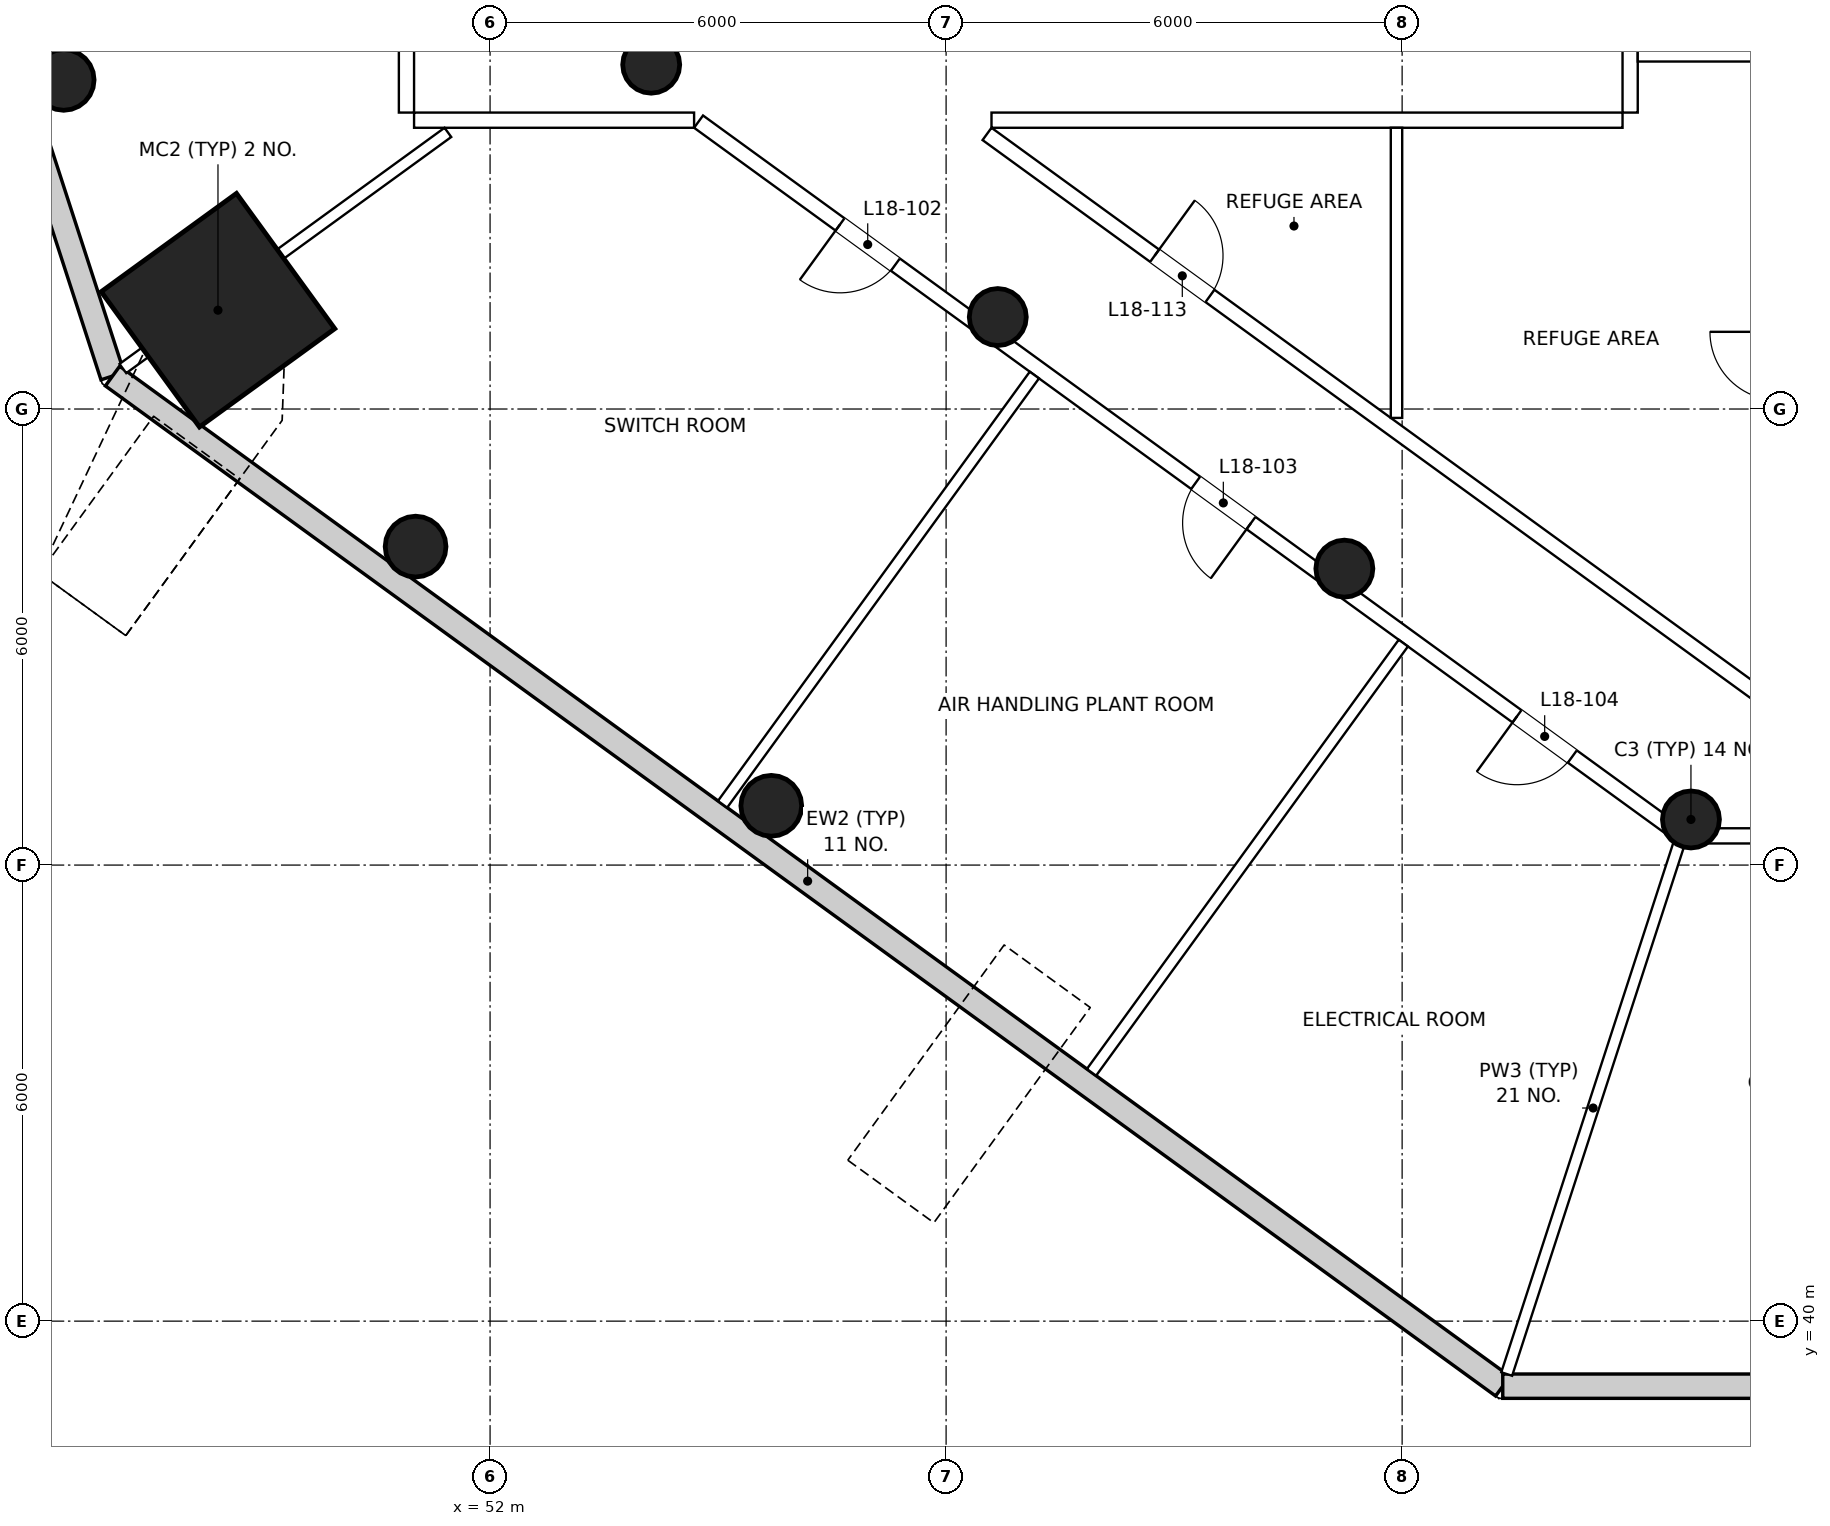
"""IFC4 building model, lengths in metres.
Left out: names, types, materials, properties, quantities, classifications, styles, units other than length and angle.
Written with IfcOpenShell. Run it as: python <this file> out.ifc"""

import sys

from ifc_helpers import new_model, si_unit, direction, frame, frame_2d, origin, origin_2d, place, context, subcontext, project, spatial, rectangle, circle, extrude, element, fill, save


model = new_model("IFC4")
c1 = context("Model", 3, precision=1e-05, world=origin(), true_north=direction((0.0, 1.0)))
c2 = subcontext(c1, "Body", "Model", "MODEL_VIEW")
j1 = project(units=[si_unit("LENGTHUNIT", "METRE"), si_unit("PLANEANGLEUNIT", "RADIAN")], contexts=[c1])
p1 = place(None, origin())
s1 = spatial("IfcSite", under=j1, at=p1, CompositionType="ELEMENT")
p2 = place(p1, origin())
s2 = spatial("IfcBuilding", under=s1, at=p2, CompositionType="ELEMENT")
p3 = place(p2, frame((0.0, 0.0, 85.8)))
s3 = spatial("IfcBuildingStorey", under=s2, at=p3, CompositionType="ELEMENT", Elevation=85.8)
p4 = place(p3, frame((46.39, 56.33, 0.0), z_axis=(0.0, 0.0, 1.0), x_axis=(1.0, 0.0, 0.0)))
e1 = element("IfcColumn", 1, at=p4, inside=s3, PredefinedType="COLUMN", context=c2, shape_type="SweptSolid", body=[
    extrude(circle(Radius=0.4, at=origin_2d()), origin(), (0.0, 0.0, 1.0), 5.0),
])
p5 = place(p3, frame((48.42, 53.3, 0.0), z_axis=(0.0, 0.0, 1.0), x_axis=(-0.809016994375, -0.587785252292, 0.0)))
e2 = element("IfcColumn", 2, at=p5, inside=s3, PredefinedType="COLUMN", context=c2, shape_type="SweptSolid", body=[
    extrude(rectangle(XDim=2.2, YDim=2.2, at=origin_2d()), origin(), (0.0, 0.0, 1.0), 5.0),
])
for number, where, z_axis, x_axis in (
    (3, (51.02, 50.19, 0.0), (0.0, 0.0, 1.0), (1.0, 0.0, 0.0)),
    (4, (55.7, 46.78, 0.0), (0.0, 0.0, 1.0), (1.0, 0.0, 0.0)),
):
    element("IfcColumn", number, at=place(p3, frame(where, z_axis=z_axis, x_axis=x_axis)), inside=s3, PredefinedType="COLUMN", context=c2, shape_type="SweptSolid", body=[
        extrude(circle(Radius=0.4, at=origin_2d()), origin(), (0.0, 0.0, 1.0), 5.0),
    ])
for number, where, z_axis, x_axis in (
    (5, (54.12, 56.53, 0.0), (0.0, 0.0, 1.0), (1.0, 0.0, 0.0)),
    (6, (58.68, 53.21, 0.0), (0.0, 0.0, 1.0), (1.0, 0.0, 0.0)),
    (7, (63.24, 49.9, 0.0), (0.0, 0.0, 1.0), (1.0, 0.0, 0.0)),
    (8, (67.8, 46.6, 0.0), (0.0, 0.0, 1.0), (1.0, 0.0, 0.0)),
):
    element("IfcColumn", number, at=place(p3, frame(where, z_axis=z_axis, x_axis=x_axis)), inside=s3, PredefinedType="COLUMN", context=c2, shape_type="SweptSolid", body=[
        extrude(circle(Radius=0.375, at=origin_2d()), origin(), (0.0, 0.0, 1.0), 5.0),
    ])
p6 = place(p3, frame((44.196, 61.164, 0.0), z_axis=(0.0, 0.0, 1.0), x_axis=(0.309021723461, -0.951054979709, 0.0)))
e9 = element("IfcWall", 9, at=p6, inside=s3, PredefinedType="SOLIDWALL", context=c2, shape_type="SweptSolid", body=[
    extrude(rectangle(XDim=9.179, YDim=0.32, at=frame_2d((4.59, 0.0))), origin(), (0.0, 0.0, 1.0), 4.7),
])
p7 = place(p3, frame((47.033, 52.434, 0.0), z_axis=(0.0, 0.0, 1.0), x_axis=(0.809018497564, -0.587783183325, 0.0)))
e10 = element("IfcWall", 10, at=p7, inside=s3, PredefinedType="SOLIDWALL", context=c2, shape_type="SweptSolid", body=[
    extrude(rectangle(XDim=22.609, YDim=0.32, at=frame_2d((11.305, 0.0))), origin(), (0.0, 0.0, 1.0), 4.7),
])
p8 = place(p3, frame((65.324, 39.144, 0.0), z_axis=(0.0, 0.0, 1.0), x_axis=(1.0, 0.0, 0.0)))
e11 = element("IfcWall", 11, at=p8, inside=s3, PredefinedType="SOLIDWALL", context=c2, shape_type="SweptSolid", body=[
    extrude(rectangle(XDim=9.352, YDim=0.32, at=frame_2d((4.676, 0.0))), origin(), (0.0, 0.0, 1.0), 4.7),
])
p9 = place(p3, frame((72.291, 46.384, 0.0), z_axis=(0.0, 0.0, 1.0), x_axis=(-1.0, 0.0, 0.0)))
e12 = element("IfcWall", 12, at=p9, inside=s3, PredefinedType="PARTITIONING", context=c2, shape_type="SweptSolid", body=[
    extrude(rectangle(XDim=4.582, YDim=0.2, at=frame_2d((2.291, 0.0))), origin(), (0.0, 0.0, 1.0), 3.7),
])
p10 = place(p9, frame((1.841, 0.0, 0.0)))
e13 = element("IfcOpeningElement", 13, at=p10, cuts=e12, PredefinedType="OPENING", context=c2, shape_type="SweptSolid", body=[
    extrude(rectangle(XDim=0.9, YDim=2.1, at=frame_2d((0.45, 1.05))), frame((0.0, 0.11, 0.0), z_axis=(0.0, -1.0, 0.0), x_axis=(1.0, 0.0, 0.0)), (0.0, 0.0, 1.0), 0.22),
])
p11 = place(p3, frame((67.65, 46.403, 0.0), z_axis=(0.0, 0.0, 1.0), x_axis=(-0.809010618519, 0.587794027805, 0.0)))
e14 = element("IfcWall", 14, at=p11, inside=s3, PredefinedType="PARTITIONING", context=c2, shape_type="SweptSolid", body=[
    extrude(rectangle(XDim=15.954, YDim=0.2, at=frame_2d((7.977, 0.0))), origin(), (0.0, 0.0, 1.0), 3.7),
])
p12 = place(p11, frame((12.753, 0.0, 0.0)))
e15 = element("IfcOpeningElement", 15, at=p12, cuts=e14, PredefinedType="OPENING", context=c2, shape_type="SweptSolid", body=[
    extrude(rectangle(XDim=0.9, YDim=2.1, at=frame_2d((0.45, 1.05))), frame((0.0, 0.11, 0.0), z_axis=(0.0, -1.0, 0.0), x_axis=(1.0, 0.0, 0.0)), (0.0, 0.0, 1.0), 0.22),
])
p13 = place(p11, frame((6.969, 0.0, 0.0)))
e16 = element("IfcOpeningElement", 16, at=p13, cuts=e14, PredefinedType="OPENING", context=c2, shape_type="SweptSolid", body=[
    extrude(rectangle(XDim=0.9, YDim=2.1, at=frame_2d((0.45, 1.05))), frame((0.0, 0.11, 0.0), z_axis=(0.0, -1.0, 0.0), x_axis=(1.0, 0.0, 0.0)), (0.0, 0.0, 1.0), 0.22),
])
p14 = place(p11, frame((1.743, 0.0, 0.0)))
e17 = element("IfcOpeningElement", 17, at=p14, cuts=e14, PredefinedType="OPENING", context=c2, shape_type="SweptSolid", body=[
    extrude(rectangle(XDim=0.9, YDim=2.1, at=frame_2d((0.45, 1.05))), frame((0.0, 0.11, 0.0), z_axis=(0.0, -1.0, 0.0), x_axis=(1.0, 0.0, 0.0)), (0.0, 0.0, 1.0), 0.22),
])
p15 = place(p3, frame((54.684, 55.8, 0.0), z_axis=(0.0, 0.0, 1.0), x_axis=(-1.0, 0.0, 0.0)))
e18 = element("IfcWall", 18, at=p15, inside=s3, PredefinedType="PARTITIONING", context=c2, shape_type="SweptSolid", body=[
    extrude(rectangle(XDim=3.684, YDim=0.2, at=frame_2d((1.842, 0.0))), origin(), (0.0, 0.0, 1.0), 4.7),
])
p16 = place(p3, frame((50.9, 55.9, 0.0), z_axis=(0.0, 0.0, 1.0), x_axis=(0.0, 1.0, 0.0)))
e19 = element("IfcWall", 19, at=p16, inside=s3, PredefinedType="PARTITIONING", context=c2, shape_type="SweptSolid", body=[
    extrude(rectangle(XDim=7.95, YDim=0.2, at=frame_2d((3.975, 0.0))), origin(), (0.0, 0.0, 1.0), 4.7),
])
p17 = place(p16, frame((2.132, 0.0, 0.0)))
e20 = element("IfcOpeningElement", 20, at=p17, cuts=e19, PredefinedType="OPENING", context=c2, shape_type="SweptSolid", body=[
    extrude(rectangle(XDim=0.9, YDim=2.1, at=frame_2d((0.45, 1.05))), frame((0.0, 0.11, 0.0), z_axis=(0.0, -1.0, 0.0), x_axis=(1.0, 0.0, 0.0)), (0.0, 0.0, 1.0), 0.22),
])
p18 = place(p16, frame((6.194, 0.0, 0.0)))
e21 = element("IfcOpeningElement", 21, at=p18, cuts=e19, PredefinedType="OPENING", context=c2, shape_type="SweptSolid", body=[
    extrude(rectangle(XDim=0.9, YDim=2.1, at=frame_2d((0.45, 1.05))), frame((0.0, 0.11, 0.0), z_axis=(0.0, -1.0, 0.0), x_axis=(1.0, 0.0, 0.0)), (0.0, 0.0, 1.0), 0.22),
])
p19 = place(p3, frame((67.0, 63.85, 0.0), z_axis=(0.0, 0.0, 1.0), x_axis=(0.0, -1.0, 0.0)))
e22 = element("IfcWall", 22, at=p19, inside=s3, PredefinedType="PARTITIONING", context=c2, shape_type="SweptSolid", body=[
    extrude(rectangle(XDim=7.95, YDim=0.2, at=frame_2d((3.975, 0.0))), origin(), (0.0, 0.0, 1.0), 4.7),
])
p20 = place(p3, frame((66.9, 55.8, 0.0), z_axis=(0.0, 0.0, 1.0), x_axis=(-1.0, 0.0, 0.0)))
e23 = element("IfcWall", 23, at=p20, inside=s3, PredefinedType="PARTITIONING", context=c2, shape_type="SweptSolid", body=[
    extrude(rectangle(XDim=8.302, YDim=0.2, at=frame_2d((4.151, 0.0))), origin(), (0.0, 0.0, 1.0), 4.7),
])
p21 = place(p3, frame((58.539, 55.619, 0.0), z_axis=(0.0, 0.0, 1.0), x_axis=(0.809018400234, -0.587783317289, 0.0)))
e24 = element("IfcWall", 24, at=p21, inside=s3, PredefinedType="PARTITIONING", context=c2, shape_type="SweptSolid", body=[
    extrude(rectangle(XDim=12.673, YDim=0.2, at=frame_2d((6.336, 0.0))), origin(), (0.0, 0.0, 1.0), 4.7),
])
p22 = place(p21, frame((2.726, 0.0, 0.0)))
e25 = element("IfcOpeningElement", 25, at=p22, cuts=e24, PredefinedType="OPENING", context=c2, shape_type="SweptSolid", body=[
    extrude(rectangle(XDim=0.9, YDim=2.1, at=frame_2d((0.45, 1.05))), frame((0.0, 0.11, 0.0), z_axis=(0.0, -1.0, 0.0), x_axis=(1.0, 0.0, 0.0)), (0.0, 0.0, 1.0), 0.22),
])
p23 = place(p3, frame((47.169, 52.532, 0.0), z_axis=(0.0, 0.0, 1.0), x_axis=(0.809003648196, 0.587803621293, 0.0)))
e26 = element("IfcWall", 26, at=p23, inside=s3, PredefinedType="PARTITIONING", context=c2, shape_type="SweptSolid", body=[
    extrude(rectangle(XDim=5.286, YDim=0.15, at=frame_2d((2.643, 0.0))), origin(), (0.0, 0.0, 1.0), 3.7),
])
p24 = place(p3, frame((65.376, 39.304, 0.0), z_axis=(0.0, 0.0, 1.0), x_axis=(0.309013310507, 0.951057713249, 0.0)))
e27 = element("IfcWall", 27, at=p24, inside=s3, PredefinedType="PARTITIONING", context=c2, shape_type="SweptSolid", body=[
    extrude(rectangle(XDim=7.359, YDim=0.15, at=frame_2d((3.68, 0.0))), origin(), (0.0, 0.0, 1.0), 3.7),
])
p25 = place(p3, frame((55.059, 46.8, 0.0), z_axis=(0.0, 0.0, 1.0), x_axis=(0.587786885163, 0.809015808023, 0.0)))
e28 = element("IfcWall", 28, at=p25, inside=s3, PredefinedType="PARTITIONING", context=c2, shape_type="SweptSolid", body=[
    extrude(rectangle(XDim=6.98, YDim=0.15, at=frame_2d((3.49, 0.0))), origin(), (0.0, 0.0, 1.0), 3.7),
])
p26 = place(p3, frame((59.913, 43.273, 0.0), z_axis=(0.0, 0.0, 1.0), x_axis=(0.587747359625, 0.809044523654, 0.0)))
e29 = element("IfcWall", 29, at=p26, inside=s3, PredefinedType="PARTITIONING", context=c2, shape_type="SweptSolid", body=[
    extrude(rectangle(XDim=6.98, YDim=0.15, at=frame_2d((3.49, 0.0))), origin(), (0.0, 0.0, 1.0), 4.7),
])
p27 = place(p3, frame((63.926, 51.883, 0.0), z_axis=(0.0, 0.0, 1.0), x_axis=(0.0, 1.0, 0.0)))
e30 = element("IfcWall", 30, at=p27, inside=s3, PredefinedType="PARTITIONING", context=c2, shape_type="SweptSolid", body=[
    extrude(rectangle(XDim=3.817, YDim=0.15, at=frame_2d((1.908, 0.0))), origin(), (0.0, 0.0, 1.0), 4.7),
])
p28 = place(p3, frame((67.1, 56.646, 0.0), z_axis=(0.0, 0.0, 1.0), x_axis=(1.0, 0.0, 0.0)))
e31 = element("IfcWall", 31, at=p28, inside=s3, PredefinedType="PARTITIONING", context=c2, shape_type="SweptSolid", body=[
    extrude(rectangle(XDim=1.75, YDim=0.15, at=frame_2d((0.875, 0.0))), origin(), (0.0, 0.0, 1.0), 4.7),
])
p29 = place(p12, origin())
e32 = element("IfcDoor", 32, at=p29, inside=s3, OperationType="SINGLE_SWING_RIGHT", PredefinedType="DOOR", context=c2, shape_type="SweptSolid", body=[
    extrude(rectangle(XDim=0.9, YDim=2.1, at=frame_2d((0.45, 1.05))), frame((0.0, 0.025, 0.0), z_axis=(0.0, -1.0, 0.0), x_axis=(1.0, 0.0, 0.0)), (0.0, 0.0, 1.0), 0.05),
])
fill(e15, e32)
p30 = place(p13, origin())
e33 = element("IfcDoor", 33, at=p30, inside=s3, OperationType="SINGLE_SWING_LEFT", PredefinedType="DOOR", context=c2, shape_type="SweptSolid", body=[
    extrude(rectangle(XDim=0.9, YDim=2.1, at=frame_2d((0.45, 1.05))), frame((0.0, 0.025, 0.0), z_axis=(0.0, -1.0, 0.0), x_axis=(1.0, 0.0, 0.0)), (0.0, 0.0, 1.0), 0.05),
])
fill(e16, e33)
p31 = place(p14, origin())
e34 = element("IfcDoor", 34, at=p31, inside=s3, OperationType="SINGLE_SWING_RIGHT", PredefinedType="DOOR", context=c2, shape_type="SweptSolid", body=[
    extrude(rectangle(XDim=0.9, YDim=2.1, at=frame_2d((0.45, 1.05))), frame((0.0, 0.025, 0.0), z_axis=(0.0, -1.0, 0.0), x_axis=(1.0, 0.0, 0.0)), (0.0, 0.0, 1.0), 0.05),
])
fill(e17, e34)
p32 = place(p22, origin())
e35 = element("IfcDoor", 35, at=p32, inside=s3, OperationType="SINGLE_SWING_LEFT", PredefinedType="DOOR", context=c2, shape_type="SweptSolid", body=[
    extrude(rectangle(XDim=0.9, YDim=2.1, at=frame_2d((0.45, 1.05))), frame((0.0, 0.025, 0.0), z_axis=(0.0, -1.0, 0.0), x_axis=(1.0, 0.0, 0.0)), (0.0, 0.0, 1.0), 0.05),
])
fill(e25, e35)
save(model, sys.argv[1])
